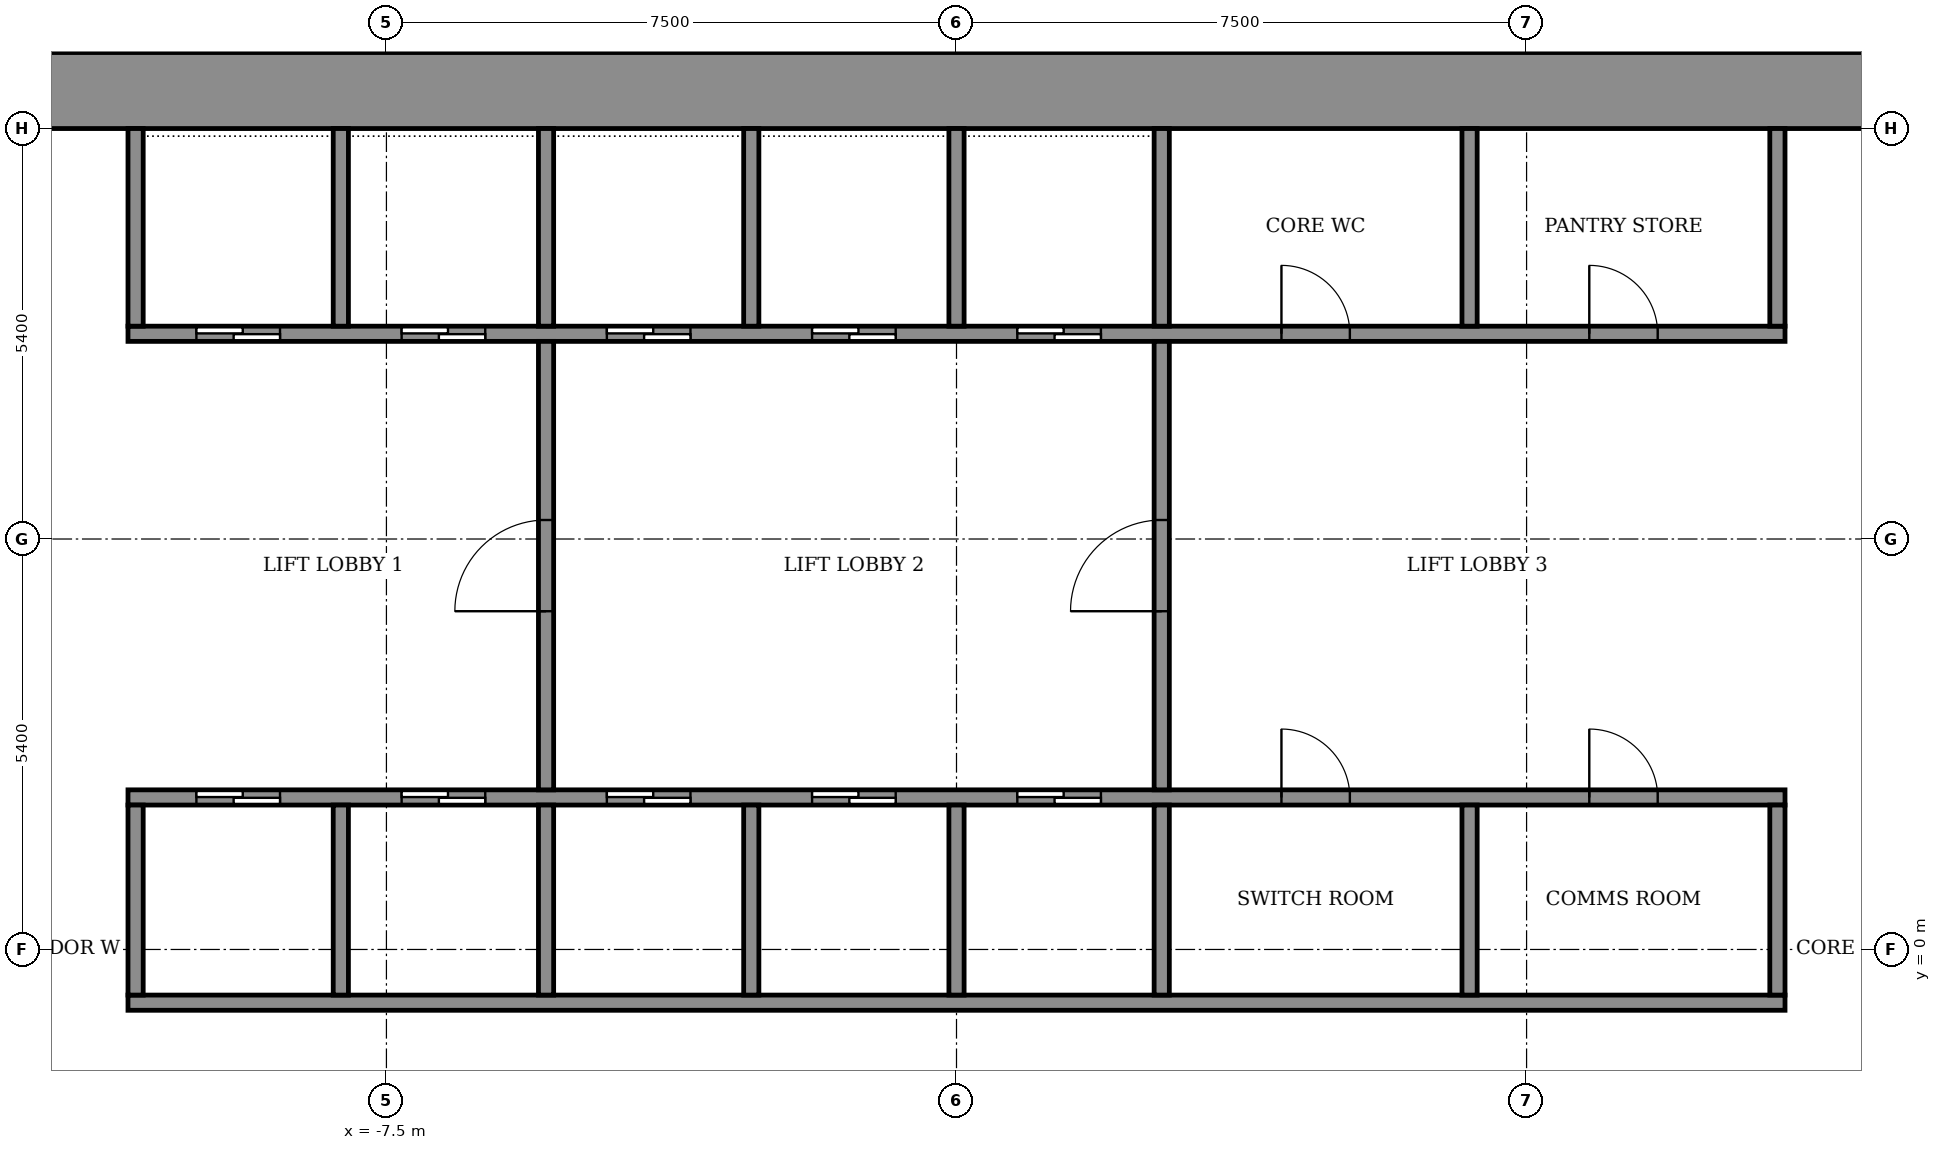
"""IFC4 building model, lengths in metres.
Left out: names, types, materials, properties, quantities, classifications, styles, units other than length and angle.
Written with IfcOpenShell. Run it as: python <this file> out.ifc"""

import sys

from ifc_helpers import new_model, si_unit, direction, frame, frame_2d, origin, place, context, subcontext, project, spatial, rectangle, extrude, element, fill, save


model = new_model("IFC4")
c1 = context("Model", 3, precision=1e-05, world=origin(), true_north=direction((0.0, 1.0)))
c2 = subcontext(c1, "Body", "Model", "MODEL_VIEW")
j1 = project(units=[si_unit("LENGTHUNIT", "METRE"), si_unit("PLANEANGLEUNIT", "RADIAN")], contexts=[c1])
p1 = place(None, origin())
s1 = spatial("IfcSite", under=j1, at=p1, CompositionType="ELEMENT")
p2 = place(p1, origin())
s2 = spatial("IfcBuilding", under=s1, at=p2, CompositionType="ELEMENT")
p3 = place(p2, frame((0.0, 0.0, 93.7)))
s3 = spatial("IfcBuildingStorey", under=s2, at=p3, CompositionType="ELEMENT", Elevation=93.7)
p4 = place(p3, frame((-14.8, 11.3, 0.0), z_axis=(0.0, 0.0, 1.0), x_axis=(1.0, 0.0, 0.0)))
e1 = element("IfcWall", 1, at=p4, inside=s3, PredefinedType="SHEAR", context=c2, shape_type="SweptSolid", body=[
    extrude(rectangle(XDim=29.6, YDim=1.0, at=frame_2d((14.8, 0.0))), origin(), (0.0, 0.0, 1.0), 3.6),
])
p5 = place(p3, frame((-10.9, -0.7, 0.0), z_axis=(0.0, 0.0, 1.0), x_axis=(1.0, 0.0, 0.0)))
e2 = element("IfcWall", 2, at=p5, inside=s3, PredefinedType="SHEAR", context=c2, shape_type="SweptSolid", body=[
    extrude(rectangle(XDim=21.8, YDim=0.2, at=frame_2d((10.9, 0.0))), origin(), (0.0, 0.0, 1.0), 3.05),
])
p6 = place(p3, frame((-10.9, 2.0, 0.0), z_axis=(0.0, 0.0, 1.0), x_axis=(1.0, 0.0, 0.0)))
e3 = element("IfcWall", 3, at=p6, inside=s3, PredefinedType="SHEAR", context=c2, shape_type="SweptSolid", body=[
    extrude(rectangle(XDim=21.8, YDim=0.2, at=frame_2d((10.9, 0.0))), origin(), (0.0, 0.0, 1.0), 3.05),
])
p7 = place(p6, frame((0.9, 0.0, 0.0)))
e4 = element("IfcOpeningElement", 4, at=p7, cuts=e3, PredefinedType="OPENING", context=c2, shape_type="SweptSolid", body=[
    extrude(rectangle(XDim=1.1, YDim=2.1, at=frame_2d((0.55, 1.05))), frame((0.0, 0.11, 0.0), z_axis=(0.0, -1.0, 0.0), x_axis=(1.0, 0.0, 0.0)), (0.0, 0.0, 1.0), 0.22),
])
p8 = place(p6, frame((3.6, 0.0, 0.0)))
e5 = element("IfcOpeningElement", 5, at=p8, cuts=e3, PredefinedType="OPENING", context=c2, shape_type="SweptSolid", body=[
    extrude(rectangle(XDim=1.1, YDim=2.1, at=frame_2d((0.55, 1.05))), frame((0.0, 0.11, 0.0), z_axis=(0.0, -1.0, 0.0), x_axis=(1.0, 0.0, 0.0)), (0.0, 0.0, 1.0), 0.22),
])
p9 = place(p6, frame((6.3, 0.0, 0.0)))
e6 = element("IfcOpeningElement", 6, at=p9, cuts=e3, PredefinedType="OPENING", context=c2, shape_type="SweptSolid", body=[
    extrude(rectangle(XDim=1.1, YDim=2.1, at=frame_2d((0.55, 1.05))), frame((0.0, 0.11, 0.0), z_axis=(0.0, -1.0, 0.0), x_axis=(1.0, 0.0, 0.0)), (0.0, 0.0, 1.0), 0.22),
])
p10 = place(p6, frame((9.0, 0.0, 0.0)))
e7 = element("IfcOpeningElement", 7, at=p10, cuts=e3, PredefinedType="OPENING", context=c2, shape_type="SweptSolid", body=[
    extrude(rectangle(XDim=1.1, YDim=2.1, at=frame_2d((0.55, 1.05))), frame((0.0, 0.11, 0.0), z_axis=(0.0, -1.0, 0.0), x_axis=(1.0, 0.0, 0.0)), (0.0, 0.0, 1.0), 0.22),
])
p11 = place(p6, frame((11.7, 0.0, 0.0)))
e8 = element("IfcOpeningElement", 8, at=p11, cuts=e3, PredefinedType="OPENING", context=c2, shape_type="SweptSolid", body=[
    extrude(rectangle(XDim=1.1, YDim=2.1, at=frame_2d((0.55, 1.05))), frame((0.0, 0.11, 0.0), z_axis=(0.0, -1.0, 0.0), x_axis=(1.0, 0.0, 0.0)), (0.0, 0.0, 1.0), 0.22),
])
p12 = place(p6, frame((15.175, 0.0, 0.0)))
e9 = element("IfcOpeningElement", 9, at=p12, cuts=e3, PredefinedType="OPENING", context=c2, shape_type="SweptSolid", body=[
    extrude(rectangle(XDim=0.9, YDim=2.1, at=frame_2d((0.45, 1.05))), frame((0.0, 0.11, 0.0), z_axis=(0.0, -1.0, 0.0), x_axis=(1.0, 0.0, 0.0)), (0.0, 0.0, 1.0), 0.22),
])
p13 = place(p6, frame((19.225, 0.0, 0.0)))
e10 = element("IfcOpeningElement", 10, at=p13, cuts=e3, PredefinedType="OPENING", context=c2, shape_type="SweptSolid", body=[
    extrude(rectangle(XDim=0.9, YDim=2.1, at=frame_2d((0.45, 1.05))), frame((0.0, 0.11, 0.0), z_axis=(0.0, -1.0, 0.0), x_axis=(1.0, 0.0, 0.0)), (0.0, 0.0, 1.0), 0.22),
])
p14 = place(p3, frame((-10.9, 8.1, 0.0), z_axis=(0.0, 0.0, 1.0), x_axis=(1.0, 0.0, 0.0)))
e11 = element("IfcWall", 11, at=p14, inside=s3, PredefinedType="SHEAR", context=c2, shape_type="SweptSolid", body=[
    extrude(rectangle(XDim=21.8, YDim=0.2, at=frame_2d((10.9, 0.0))), origin(), (0.0, 0.0, 1.0), 3.05),
])
p15 = place(p14, frame((0.9, 0.0, 0.0)))
e12 = element("IfcOpeningElement", 12, at=p15, cuts=e11, PredefinedType="OPENING", context=c2, shape_type="SweptSolid", body=[
    extrude(rectangle(XDim=1.1, YDim=2.1, at=frame_2d((0.55, 1.05))), frame((0.0, 0.11, 0.0), z_axis=(0.0, -1.0, 0.0), x_axis=(1.0, 0.0, 0.0)), (0.0, 0.0, 1.0), 0.22),
])
p16 = place(p14, frame((3.6, 0.0, 0.0)))
e13 = element("IfcOpeningElement", 13, at=p16, cuts=e11, PredefinedType="OPENING", context=c2, shape_type="SweptSolid", body=[
    extrude(rectangle(XDim=1.1, YDim=2.1, at=frame_2d((0.55, 1.05))), frame((0.0, 0.11, 0.0), z_axis=(0.0, -1.0, 0.0), x_axis=(1.0, 0.0, 0.0)), (0.0, 0.0, 1.0), 0.22),
])
p17 = place(p14, frame((6.3, 0.0, 0.0)))
e14 = element("IfcOpeningElement", 14, at=p17, cuts=e11, PredefinedType="OPENING", context=c2, shape_type="SweptSolid", body=[
    extrude(rectangle(XDim=1.1, YDim=2.1, at=frame_2d((0.55, 1.05))), frame((0.0, 0.11, 0.0), z_axis=(0.0, -1.0, 0.0), x_axis=(1.0, 0.0, 0.0)), (0.0, 0.0, 1.0), 0.22),
])
p18 = place(p14, frame((9.0, 0.0, 0.0)))
e15 = element("IfcOpeningElement", 15, at=p18, cuts=e11, PredefinedType="OPENING", context=c2, shape_type="SweptSolid", body=[
    extrude(rectangle(XDim=1.1, YDim=2.1, at=frame_2d((0.55, 1.05))), frame((0.0, 0.11, 0.0), z_axis=(0.0, -1.0, 0.0), x_axis=(1.0, 0.0, 0.0)), (0.0, 0.0, 1.0), 0.22),
])
p19 = place(p14, frame((11.7, 0.0, 0.0)))
e16 = element("IfcOpeningElement", 16, at=p19, cuts=e11, PredefinedType="OPENING", context=c2, shape_type="SweptSolid", body=[
    extrude(rectangle(XDim=1.1, YDim=2.1, at=frame_2d((0.55, 1.05))), frame((0.0, 0.11, 0.0), z_axis=(0.0, -1.0, 0.0), x_axis=(1.0, 0.0, 0.0)), (0.0, 0.0, 1.0), 0.22),
])
p20 = place(p14, frame((15.175, 0.0, 0.0)))
e17 = element("IfcOpeningElement", 17, at=p20, cuts=e11, PredefinedType="OPENING", context=c2, shape_type="SweptSolid", body=[
    extrude(rectangle(XDim=0.9, YDim=2.1, at=frame_2d((0.45, 1.05))), frame((0.0, 0.11, 0.0), z_axis=(0.0, -1.0, 0.0), x_axis=(1.0, 0.0, 0.0)), (0.0, 0.0, 1.0), 0.22),
])
p21 = place(p14, frame((19.225, 0.0, 0.0)))
e18 = element("IfcOpeningElement", 18, at=p21, cuts=e11, PredefinedType="OPENING", context=c2, shape_type="SweptSolid", body=[
    extrude(rectangle(XDim=0.9, YDim=2.1, at=frame_2d((0.45, 1.05))), frame((0.0, 0.11, 0.0), z_axis=(0.0, -1.0, 0.0), x_axis=(1.0, 0.0, 0.0)), (0.0, 0.0, 1.0), 0.22),
])
for number, where, z_axis, x_axis in (
    (19, (-10.8, -0.6, 0.0), (0.0, 0.0, 1.0), (0.0, 1.0, 0.0)),
    (20, (-8.1, -0.6, 0.0), (0.0, 0.0, 1.0), (0.0, 1.0, 0.0)),
    (21, (-5.4, -0.6, 0.0), (0.0, 0.0, 1.0), (0.0, 1.0, 0.0)),
    (22, (-2.7, -0.6, 0.0), (0.0, 0.0, 1.0), (0.0, 1.0, 0.0)),
    (23, (0.0, -0.6, 0.0), (0.0, 0.0, 1.0), (0.0, 1.0, 0.0)),
    (24, (2.7, -0.6, 0.0), (0.0, 0.0, 1.0), (0.0, 1.0, 0.0)),
):
    element("IfcWall", number, at=place(p3, frame(where, z_axis=z_axis, x_axis=x_axis)), inside=s3, PredefinedType="SHEAR", context=c2, shape_type="SweptSolid", body=[
        extrude(rectangle(XDim=2.5, YDim=0.2, at=frame_2d((1.25, 0.0))), origin(), (0.0, 0.0, 1.0), 3.05),
    ])
for number, where, z_axis, x_axis in (
    (25, (6.75, -0.6, 0.0), (0.0, 0.0, 1.0), (0.0, 1.0, 0.0)),
    (26, (10.8, -0.6, 0.0), (0.0, 0.0, 1.0), (0.0, 1.0, 0.0)),
):
    element("IfcWall", number, at=place(p3, frame(where, z_axis=z_axis, x_axis=x_axis)), inside=s3, PredefinedType="STANDARD", context=c2, shape_type="SweptSolid", body=[
        extrude(rectangle(XDim=2.5, YDim=0.2, at=frame_2d((1.25, 0.0))), origin(), (0.0, 0.0, 1.0), 3.05),
    ])
for number, where, z_axis, x_axis in (
    (27, (-10.8, 8.2, 0.0), (0.0, 0.0, 1.0), (0.0, 1.0, 0.0)),
    (28, (-8.1, 8.2, 0.0), (0.0, 0.0, 1.0), (0.0, 1.0, 0.0)),
    (29, (-5.4, 8.2, 0.0), (0.0, 0.0, 1.0), (0.0, 1.0, 0.0)),
    (30, (-2.7, 8.2, 0.0), (0.0, 0.0, 1.0), (0.0, 1.0, 0.0)),
    (31, (0.0, 8.2, 0.0), (0.0, 0.0, 1.0), (0.0, 1.0, 0.0)),
    (32, (2.7, 8.2, 0.0), (0.0, 0.0, 1.0), (0.0, 1.0, 0.0)),
):
    element("IfcWall", number, at=place(p3, frame(where, z_axis=z_axis, x_axis=x_axis)), inside=s3, PredefinedType="SHEAR", context=c2, shape_type="SweptSolid", body=[
        extrude(rectangle(XDim=2.6, YDim=0.2, at=frame_2d((1.3, 0.0))), origin(), (0.0, 0.0, 1.0), 3.05),
    ])
for number, where, z_axis, x_axis in (
    (33, (6.75, 8.2, 0.0), (0.0, 0.0, 1.0), (0.0, 1.0, 0.0)),
    (34, (10.8, 8.2, 0.0), (0.0, 0.0, 1.0), (0.0, 1.0, 0.0)),
):
    element("IfcWall", number, at=place(p3, frame(where, z_axis=z_axis, x_axis=x_axis)), inside=s3, PredefinedType="STANDARD", context=c2, shape_type="SweptSolid", body=[
        extrude(rectangle(XDim=2.6, YDim=0.2, at=frame_2d((1.3, 0.0))), origin(), (0.0, 0.0, 1.0), 3.05),
    ])
p22 = place(p3, frame((-5.4, 2.1, 0.0), z_axis=(0.0, 0.0, 1.0), x_axis=(0.0, 1.0, 0.0)))
e35 = element("IfcWall", 35, at=p22, inside=s3, PredefinedType="STANDARD", context=c2, shape_type="SweptSolid", body=[
    extrude(rectangle(XDim=5.9, YDim=0.2, at=frame_2d((2.95, 0.0))), origin(), (0.0, 0.0, 1.0), 3.05),
])
p23 = place(p22, frame((2.35, 0.0, 0.0)))
e36 = element("IfcOpeningElement", 36, at=p23, cuts=e35, PredefinedType="OPENING", context=c2, shape_type="SweptSolid", body=[
    extrude(rectangle(XDim=1.2, YDim=2.1, at=frame_2d((0.6, 1.05))), frame((0.0, 0.11, 0.0), z_axis=(0.0, -1.0, 0.0), x_axis=(1.0, 0.0, 0.0)), (0.0, 0.0, 1.0), 0.22),
])
p24 = place(p3, frame((2.7, 2.1, 0.0), z_axis=(0.0, 0.0, 1.0), x_axis=(0.0, 1.0, 0.0)))
e37 = element("IfcWall", 37, at=p24, inside=s3, PredefinedType="STANDARD", context=c2, shape_type="SweptSolid", body=[
    extrude(rectangle(XDim=5.9, YDim=0.2, at=frame_2d((2.95, 0.0))), origin(), (0.0, 0.0, 1.0), 3.05),
])
p25 = place(p24, frame((2.35, 0.0, 0.0)))
e38 = element("IfcOpeningElement", 38, at=p25, cuts=e37, PredefinedType="OPENING", context=c2, shape_type="SweptSolid", body=[
    extrude(rectangle(XDim=1.2, YDim=2.1, at=frame_2d((0.6, 1.05))), frame((0.0, 0.11, 0.0), z_axis=(0.0, -1.0, 0.0), x_axis=(1.0, 0.0, 0.0)), (0.0, 0.0, 1.0), 0.22),
])
p26 = place(p7, origin())
e39 = element("IfcDoor", 39, at=p26, inside=s3, OperationType="SLIDING_TO_LEFT", PredefinedType="DOOR", context=c2, shape_type="SweptSolid", body=[
    extrude(rectangle(XDim=1.1, YDim=2.1, at=frame_2d((0.55, 1.05))), frame((0.0, 0.025, 0.0), z_axis=(0.0, -1.0, 0.0), x_axis=(1.0, 0.0, 0.0)), (0.0, 0.0, 1.0), 0.05),
])
fill(e4, e39)
p27 = place(p8, origin())
e40 = element("IfcDoor", 40, at=p27, inside=s3, OperationType="SLIDING_TO_LEFT", PredefinedType="DOOR", context=c2, shape_type="SweptSolid", body=[
    extrude(rectangle(XDim=1.1, YDim=2.1, at=frame_2d((0.55, 1.05))), frame((0.0, 0.025, 0.0), z_axis=(0.0, -1.0, 0.0), x_axis=(1.0, 0.0, 0.0)), (0.0, 0.0, 1.0), 0.05),
])
fill(e5, e40)
p28 = place(p9, origin())
e41 = element("IfcDoor", 41, at=p28, inside=s3, OperationType="SLIDING_TO_LEFT", PredefinedType="DOOR", context=c2, shape_type="SweptSolid", body=[
    extrude(rectangle(XDim=1.1, YDim=2.1, at=frame_2d((0.55, 1.05))), frame((0.0, 0.025, 0.0), z_axis=(0.0, -1.0, 0.0), x_axis=(1.0, 0.0, 0.0)), (0.0, 0.0, 1.0), 0.05),
])
fill(e6, e41)
p29 = place(p10, origin())
e42 = element("IfcDoor", 42, at=p29, inside=s3, OperationType="SLIDING_TO_LEFT", PredefinedType="DOOR", context=c2, shape_type="SweptSolid", body=[
    extrude(rectangle(XDim=1.1, YDim=2.1, at=frame_2d((0.55, 1.05))), frame((0.0, 0.025, 0.0), z_axis=(0.0, -1.0, 0.0), x_axis=(1.0, 0.0, 0.0)), (0.0, 0.0, 1.0), 0.05),
])
fill(e7, e42)
p30 = place(p11, origin())
e43 = element("IfcDoor", 43, at=p30, inside=s3, OperationType="SLIDING_TO_LEFT", PredefinedType="DOOR", context=c2, shape_type="SweptSolid", body=[
    extrude(rectangle(XDim=1.1, YDim=2.1, at=frame_2d((0.55, 1.05))), frame((0.0, 0.025, 0.0), z_axis=(0.0, -1.0, 0.0), x_axis=(1.0, 0.0, 0.0)), (0.0, 0.0, 1.0), 0.05),
])
fill(e8, e43)
p31 = place(p15, origin())
e44 = element("IfcDoor", 44, at=p31, inside=s3, OperationType="SLIDING_TO_LEFT", PredefinedType="DOOR", context=c2, shape_type="SweptSolid", body=[
    extrude(rectangle(XDim=1.1, YDim=2.1, at=frame_2d((0.55, 1.05))), frame((0.0, 0.025, 0.0), z_axis=(0.0, -1.0, 0.0), x_axis=(1.0, 0.0, 0.0)), (0.0, 0.0, 1.0), 0.05),
])
fill(e12, e44)
p32 = place(p16, origin())
e45 = element("IfcDoor", 45, at=p32, inside=s3, OperationType="SLIDING_TO_LEFT", PredefinedType="DOOR", context=c2, shape_type="SweptSolid", body=[
    extrude(rectangle(XDim=1.1, YDim=2.1, at=frame_2d((0.55, 1.05))), frame((0.0, 0.025, 0.0), z_axis=(0.0, -1.0, 0.0), x_axis=(1.0, 0.0, 0.0)), (0.0, 0.0, 1.0), 0.05),
])
fill(e13, e45)
p33 = place(p17, origin())
e46 = element("IfcDoor", 46, at=p33, inside=s3, OperationType="SLIDING_TO_LEFT", PredefinedType="DOOR", context=c2, shape_type="SweptSolid", body=[
    extrude(rectangle(XDim=1.1, YDim=2.1, at=frame_2d((0.55, 1.05))), frame((0.0, 0.025, 0.0), z_axis=(0.0, -1.0, 0.0), x_axis=(1.0, 0.0, 0.0)), (0.0, 0.0, 1.0), 0.05),
])
fill(e14, e46)
p34 = place(p18, origin())
e47 = element("IfcDoor", 47, at=p34, inside=s3, OperationType="SLIDING_TO_LEFT", PredefinedType="DOOR", context=c2, shape_type="SweptSolid", body=[
    extrude(rectangle(XDim=1.1, YDim=2.1, at=frame_2d((0.55, 1.05))), frame((0.0, 0.025, 0.0), z_axis=(0.0, -1.0, 0.0), x_axis=(1.0, 0.0, 0.0)), (0.0, 0.0, 1.0), 0.05),
])
fill(e15, e47)
p35 = place(p19, origin())
e48 = element("IfcDoor", 48, at=p35, inside=s3, OperationType="SLIDING_TO_LEFT", PredefinedType="DOOR", context=c2, shape_type="SweptSolid", body=[
    extrude(rectangle(XDim=1.1, YDim=2.1, at=frame_2d((0.55, 1.05))), frame((0.0, 0.025, 0.0), z_axis=(0.0, -1.0, 0.0), x_axis=(1.0, 0.0, 0.0)), (0.0, 0.0, 1.0), 0.05),
])
fill(e16, e48)
p36 = place(p12, origin())
e49 = element("IfcDoor", 49, at=p36, inside=s3, OperationType="SINGLE_SWING_LEFT", PredefinedType="DOOR", context=c2, shape_type="SweptSolid", body=[
    extrude(rectangle(XDim=0.9, YDim=2.1, at=frame_2d((0.45, 1.05))), frame((0.0, 0.025, 0.0), z_axis=(0.0, -1.0, 0.0), x_axis=(1.0, 0.0, 0.0)), (0.0, 0.0, 1.0), 0.05),
])
fill(e9, e49)
p37 = place(p13, origin())
e50 = element("IfcDoor", 50, at=p37, inside=s3, OperationType="SINGLE_SWING_LEFT", PredefinedType="DOOR", context=c2, shape_type="SweptSolid", body=[
    extrude(rectangle(XDim=0.9, YDim=2.1, at=frame_2d((0.45, 1.05))), frame((0.0, 0.025, 0.0), z_axis=(0.0, -1.0, 0.0), x_axis=(1.0, 0.0, 0.0)), (0.0, 0.0, 1.0), 0.05),
])
fill(e10, e50)
p38 = place(p20, origin())
e51 = element("IfcDoor", 51, at=p38, inside=s3, OperationType="SINGLE_SWING_RIGHT", PredefinedType="DOOR", context=c2, shape_type="SweptSolid", body=[
    extrude(rectangle(XDim=0.9, YDim=2.1, at=frame_2d((0.45, 1.05))), frame((0.0, 0.025, 0.0), z_axis=(0.0, -1.0, 0.0), x_axis=(1.0, 0.0, 0.0)), (0.0, 0.0, 1.0), 0.05),
])
fill(e17, e51)
p39 = place(p21, origin())
e52 = element("IfcDoor", 52, at=p39, inside=s3, OperationType="SINGLE_SWING_RIGHT", PredefinedType="DOOR", context=c2, shape_type="SweptSolid", body=[
    extrude(rectangle(XDim=0.9, YDim=2.1, at=frame_2d((0.45, 1.05))), frame((0.0, 0.025, 0.0), z_axis=(0.0, -1.0, 0.0), x_axis=(1.0, 0.0, 0.0)), (0.0, 0.0, 1.0), 0.05),
])
fill(e18, e52)
p40 = place(p23, origin())
e53 = element("IfcDoor", 53, at=p40, inside=s3, OperationType="SINGLE_SWING_LEFT", PredefinedType="DOOR", context=c2, shape_type="SweptSolid", body=[
    extrude(rectangle(XDim=1.2, YDim=2.1, at=frame_2d((0.6, 1.05))), frame((0.0, 0.025, 0.0), z_axis=(0.0, -1.0, 0.0), x_axis=(1.0, 0.0, 0.0)), (0.0, 0.0, 1.0), 0.05),
])
fill(e36, e53)
p41 = place(p25, origin())
e54 = element("IfcDoor", 54, at=p41, inside=s3, OperationType="SINGLE_SWING_LEFT", PredefinedType="DOOR", context=c2, shape_type="SweptSolid", body=[
    extrude(rectangle(XDim=1.2, YDim=2.1, at=frame_2d((0.6, 1.05))), frame((0.0, 0.025, 0.0), z_axis=(0.0, -1.0, 0.0), x_axis=(1.0, 0.0, 0.0)), (0.0, 0.0, 1.0), 0.05),
])
fill(e38, e54)
save(model, sys.argv[1])
